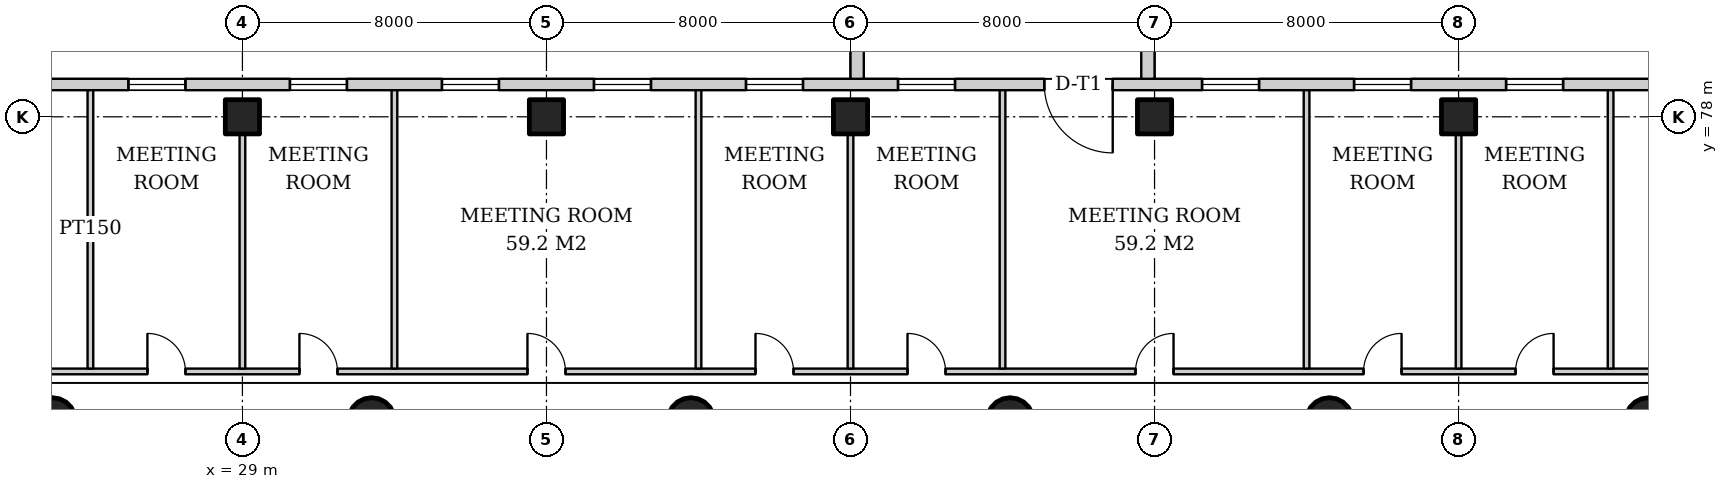
"""IFC4 building model, lengths in metres.
Left out: names, types, materials, properties, quantities, classifications, styles, units other than length and angle.
Written with IfcOpenShell. Run it as: python <this file> out.ifc"""

import sys

from ifc_helpers import new_model, si_unit, direction, frame, frame_2d, origin, origin_2d, place, context, subcontext, project, spatial, rectangle, hollow_circle, extrude, element, fill, save


model = new_model("IFC4")
c1 = context("Model", 3, precision=1e-05, world=origin(), true_north=direction((0.0, 1.0)))
c2 = subcontext(c1, "Body", "Model", "MODEL_VIEW")
j1 = project(units=[si_unit("LENGTHUNIT", "METRE"), si_unit("PLANEANGLEUNIT", "RADIAN")], contexts=[c1])
p1 = place(None, origin())
s1 = spatial("IfcSite", under=j1, at=p1, CompositionType="ELEMENT")
p2 = place(p1, origin())
s2 = spatial("IfcBuilding", under=s1, at=p2, CompositionType="ELEMENT")
p3 = place(p2, frame((0.0, 0.0, 11.0)))
s3 = spatial("IfcBuildingStorey", under=s2, at=p3, CompositionType="ELEMENT", Elevation=11.0)
for number, where, z_axis, x_axis in (
    (1, (29.0, 78.0, 0.0), (0.0, 0.0, 1.0), (1.0, 0.0, 0.0)),
    (2, (37.0, 78.0, 0.0), (0.0, 0.0, 1.0), (1.0, 0.0, 0.0)),
    (3, (45.0, 78.0, 0.0), (0.0, 0.0, 1.0), (1.0, 0.0, 0.0)),
    (4, (53.0, 78.0, 0.0), (0.0, 0.0, 1.0), (1.0, 0.0, 0.0)),
    (5, (61.0, 78.0, 0.0), (0.0, 0.0, 1.0), (1.0, 0.0, 0.0)),
):
    element("IfcColumn", number, at=place(p3, frame(where, z_axis=z_axis, x_axis=x_axis)), inside=s3, PredefinedType="COLUMN", context=c2, shape_type="SweptSolid", body=[
        extrude(rectangle(XDim=0.9, YDim=0.9, at=origin_2d()), origin(), (0.0, 0.0, 1.0), 5.0),
    ])
for number, where, z_axis, x_axis in (
    (6, (66.0, 70.0, 0.0), (0.0, 0.0, 1.0), (1.0, 0.0, 0.0)),
    (7, (24.0, 70.0, 0.0), (0.0, 0.0, 1.0), (1.0, 0.0, 0.0)),
    (8, (57.6, 70.0, 0.0), (0.0, 0.0, 1.0), (1.0, 0.0, 0.0)),
    (9, (49.2, 70.0, 0.0), (0.0, 0.0, 1.0), (1.0, 0.0, 0.0)),
    (10, (40.8, 70.0, 0.0), (0.0, 0.0, 1.0), (1.0, 0.0, 0.0)),
    (11, (32.4, 70.0, 0.0), (0.0, 0.0, 1.0), (1.0, 0.0, 0.0)),
):
    element("IfcColumn", number, at=place(p3, frame(where, z_axis=z_axis, x_axis=x_axis)), inside=s3, PredefinedType="COLUMN", context=c2, shape_type="SweptSolid", body=[
        extrude(hollow_circle(Radius=0.61, WallThickness=0.04, at=origin_2d()), origin(), (0.0, 0.0, 1.0), 5.0),
    ])
p4 = place(p3, frame((78.0, 78.85, 0.0), z_axis=(0.0, 0.0, 1.0), x_axis=(-1.0, 0.0, 0.0)))
e12 = element("IfcWall", 12, at=p4, inside=s3, PredefinedType="SOLIDWALL", context=c2, shape_type="SweptSolid", body=[
    extrude(rectangle(XDim=58.0, YDim=0.3, at=frame_2d((29.0, 0.0))), origin(), (0.0, 0.0, 1.0), 4.7),
])
p5 = place(p4, frame((1.5, 0.0, 0.9)))
e13 = element("IfcOpeningElement", 13, at=p5, cuts=e12, PredefinedType="OPENING", context=c2, shape_type="SweptSolid", body=[
    extrude(rectangle(XDim=1.5, YDim=3.2, at=frame_2d((0.75, 1.6))), frame((0.0, 0.16, 0.0), z_axis=(0.0, -1.0, 0.0), x_axis=(1.0, 0.0, 0.0)), (0.0, 0.0, 1.0), 0.32),
])
p6 = place(p4, frame((6.0, 0.0, 0.9)))
e14 = element("IfcOpeningElement", 14, at=p6, cuts=e12, PredefinedType="OPENING", context=c2, shape_type="SweptSolid", body=[
    extrude(rectangle(XDim=1.5, YDim=3.2, at=frame_2d((0.75, 1.6))), frame((0.0, 0.16, 0.0), z_axis=(0.0, -1.0, 0.0), x_axis=(1.0, 0.0, 0.0)), (0.0, 0.0, 1.0), 0.32),
])
p7 = place(p4, frame((10.25, 0.0, 0.9)))
e15 = element("IfcOpeningElement", 15, at=p7, cuts=e12, PredefinedType="OPENING", context=c2, shape_type="SweptSolid", body=[
    extrude(rectangle(XDim=1.5, YDim=3.2, at=frame_2d((0.75, 1.6))), frame((0.0, 0.16, 0.0), z_axis=(0.0, -1.0, 0.0), x_axis=(1.0, 0.0, 0.0)), (0.0, 0.0, 1.0), 0.32),
])
p8 = place(p4, frame((14.25, 0.0, 0.9)))
e16 = element("IfcOpeningElement", 16, at=p8, cuts=e12, PredefinedType="OPENING", context=c2, shape_type="SweptSolid", body=[
    extrude(rectangle(XDim=1.5, YDim=3.2, at=frame_2d((0.75, 1.6))), frame((0.0, 0.16, 0.0), z_axis=(0.0, -1.0, 0.0), x_axis=(1.0, 0.0, 0.0)), (0.0, 0.0, 1.0), 0.32),
])
p9 = place(p4, frame((18.25, 0.0, 0.9)))
e17 = element("IfcOpeningElement", 17, at=p9, cuts=e12, PredefinedType="OPENING", context=c2, shape_type="SweptSolid", body=[
    extrude(rectangle(XDim=1.5, YDim=3.2, at=frame_2d((0.75, 1.6))), frame((0.0, 0.16, 0.0), z_axis=(0.0, -1.0, 0.0), x_axis=(1.0, 0.0, 0.0)), (0.0, 0.0, 1.0), 0.32),
])
p10 = place(p4, frame((22.25, 0.0, 0.9)))
e18 = element("IfcOpeningElement", 18, at=p10, cuts=e12, PredefinedType="OPENING", context=c2, shape_type="SweptSolid", body=[
    extrude(rectangle(XDim=1.5, YDim=3.2, at=frame_2d((0.75, 1.6))), frame((0.0, 0.16, 0.0), z_axis=(0.0, -1.0, 0.0), x_axis=(1.0, 0.0, 0.0)), (0.0, 0.0, 1.0), 0.32),
])
p11 = place(p4, frame((26.1, 0.0, 0.0)))
e19 = element("IfcOpeningElement", 19, at=p11, cuts=e12, PredefinedType="OPENING", context=c2, shape_type="SweptSolid", body=[
    extrude(rectangle(XDim=1.8, YDim=2.4, at=frame_2d((0.9, 1.2))), frame((0.0, 0.16, 0.0), z_axis=(0.0, -1.0, 0.0), x_axis=(1.0, 0.0, 0.0)), (0.0, 0.0, 1.0), 0.32),
])
p12 = place(p4, frame((30.25, 0.0, 0.9)))
e20 = element("IfcOpeningElement", 20, at=p12, cuts=e12, PredefinedType="OPENING", context=c2, shape_type="SweptSolid", body=[
    extrude(rectangle(XDim=1.5, YDim=3.2, at=frame_2d((0.75, 1.6))), frame((0.0, 0.16, 0.0), z_axis=(0.0, -1.0, 0.0), x_axis=(1.0, 0.0, 0.0)), (0.0, 0.0, 1.0), 0.32),
])
p13 = place(p4, frame((34.25, 0.0, 0.9)))
e21 = element("IfcOpeningElement", 21, at=p13, cuts=e12, PredefinedType="OPENING", context=c2, shape_type="SweptSolid", body=[
    extrude(rectangle(XDim=1.5, YDim=3.2, at=frame_2d((0.75, 1.6))), frame((0.0, 0.16, 0.0), z_axis=(0.0, -1.0, 0.0), x_axis=(1.0, 0.0, 0.0)), (0.0, 0.0, 1.0), 0.32),
])
p14 = place(p4, frame((38.25, 0.0, 0.9)))
e22 = element("IfcOpeningElement", 22, at=p14, cuts=e12, PredefinedType="OPENING", context=c2, shape_type="SweptSolid", body=[
    extrude(rectangle(XDim=1.5, YDim=3.2, at=frame_2d((0.75, 1.6))), frame((0.0, 0.16, 0.0), z_axis=(0.0, -1.0, 0.0), x_axis=(1.0, 0.0, 0.0)), (0.0, 0.0, 1.0), 0.32),
])
p15 = place(p4, frame((42.25, 0.0, 0.9)))
e23 = element("IfcOpeningElement", 23, at=p15, cuts=e12, PredefinedType="OPENING", context=c2, shape_type="SweptSolid", body=[
    extrude(rectangle(XDim=1.5, YDim=3.2, at=frame_2d((0.75, 1.6))), frame((0.0, 0.16, 0.0), z_axis=(0.0, -1.0, 0.0), x_axis=(1.0, 0.0, 0.0)), (0.0, 0.0, 1.0), 0.32),
])
p16 = place(p4, frame((46.25, 0.0, 0.9)))
e24 = element("IfcOpeningElement", 24, at=p16, cuts=e12, PredefinedType="OPENING", context=c2, shape_type="SweptSolid", body=[
    extrude(rectangle(XDim=1.5, YDim=3.2, at=frame_2d((0.75, 1.6))), frame((0.0, 0.16, 0.0), z_axis=(0.0, -1.0, 0.0), x_axis=(1.0, 0.0, 0.0)), (0.0, 0.0, 1.0), 0.32),
])
p17 = place(p4, frame((50.5, 0.0, 0.9)))
e25 = element("IfcOpeningElement", 25, at=p17, cuts=e12, PredefinedType="OPENING", context=c2, shape_type="SweptSolid", body=[
    extrude(rectangle(XDim=1.5, YDim=3.2, at=frame_2d((0.75, 1.6))), frame((0.0, 0.16, 0.0), z_axis=(0.0, -1.0, 0.0), x_axis=(1.0, 0.0, 0.0)), (0.0, 0.0, 1.0), 0.32),
])
p18 = place(p4, frame((55.0, 0.0, 0.9)))
e26 = element("IfcOpeningElement", 26, at=p18, cuts=e12, PredefinedType="OPENING", context=c2, shape_type="SweptSolid", body=[
    extrude(rectangle(XDim=1.5, YDim=3.2, at=frame_2d((0.75, 1.6))), frame((0.0, 0.16, 0.0), z_axis=(0.0, -1.0, 0.0), x_axis=(1.0, 0.0, 0.0)), (0.0, 0.0, 1.0), 0.32),
])
for number, where, z_axis, x_axis in (
    (27, (45.175, 79.0, 0.0), (0.0, 0.0, 1.0), (0.0, 1.0, 0.0)),
    (28, (52.825, 79.0, 0.0), (0.0, 0.0, 1.0), (0.0, 1.0, 0.0)),
):
    element("IfcWall", number, at=place(p3, frame(where, z_axis=z_axis, x_axis=x_axis)), inside=s3, PredefinedType="PARAPET", context=c2, shape_type="SweptSolid", body=[
        extrude(rectangle(XDim=8.0, YDim=0.35, at=frame_2d((4.0, 0.0))), origin(), (0.0, 0.0, 1.0), 1.1),
    ])
p19 = place(p3, frame((20.3, 71.3, 0.0), z_axis=(0.0, 0.0, 1.0), x_axis=(1.0, 0.0, 0.0)))
e29 = element("IfcWall", 29, at=p19, inside=s3, PredefinedType="PARTITIONING", context=c2, shape_type="SweptSolid", body=[
    extrude(rectangle(XDim=57.4, YDim=0.15, at=frame_2d((28.7, 0.0))), origin(), (0.0, 0.0, 1.0), 3.2),
])
p20 = place(p19, frame((1.85, 0.0, 0.0)))
e30 = element("IfcOpeningElement", 30, at=p20, cuts=e29, PredefinedType="OPENING", context=c2, shape_type="SweptSolid", body=[
    extrude(rectangle(XDim=1.0, YDim=2.1, at=frame_2d((0.5, 1.05))), frame((0.0, 0.085, 0.0), z_axis=(0.0, -1.0, 0.0), x_axis=(1.0, 0.0, 0.0)), (0.0, 0.0, 1.0), 0.17),
])
p21 = place(p19, frame((6.2, 0.0, 0.0)))
e31 = element("IfcOpeningElement", 31, at=p21, cuts=e29, PredefinedType="OPENING", context=c2, shape_type="SweptSolid", body=[
    extrude(rectangle(XDim=1.0, YDim=2.1, at=frame_2d((0.5, 1.05))), frame((0.0, 0.085, 0.0), z_axis=(0.0, -1.0, 0.0), x_axis=(1.0, 0.0, 0.0)), (0.0, 0.0, 1.0), 0.17),
])
p22 = place(p19, frame((10.2, 0.0, 0.0)))
e32 = element("IfcOpeningElement", 32, at=p22, cuts=e29, PredefinedType="OPENING", context=c2, shape_type="SweptSolid", body=[
    extrude(rectangle(XDim=1.0, YDim=2.1, at=frame_2d((0.5, 1.05))), frame((0.0, 0.085, 0.0), z_axis=(0.0, -1.0, 0.0), x_axis=(1.0, 0.0, 0.0)), (0.0, 0.0, 1.0), 0.17),
])
p23 = place(p19, frame((16.2, 0.0, 0.0)))
e33 = element("IfcOpeningElement", 33, at=p23, cuts=e29, PredefinedType="OPENING", context=c2, shape_type="SweptSolid", body=[
    extrude(rectangle(XDim=1.0, YDim=2.1, at=frame_2d((0.5, 1.05))), frame((0.0, 0.085, 0.0), z_axis=(0.0, -1.0, 0.0), x_axis=(1.0, 0.0, 0.0)), (0.0, 0.0, 1.0), 0.17),
])
p24 = place(p19, frame((22.2, 0.0, 0.0)))
e34 = element("IfcOpeningElement", 34, at=p24, cuts=e29, PredefinedType="OPENING", context=c2, shape_type="SweptSolid", body=[
    extrude(rectangle(XDim=1.0, YDim=2.1, at=frame_2d((0.5, 1.05))), frame((0.0, 0.085, 0.0), z_axis=(0.0, -1.0, 0.0), x_axis=(1.0, 0.0, 0.0)), (0.0, 0.0, 1.0), 0.17),
])
p25 = place(p19, frame((26.2, 0.0, 0.0)))
e35 = element("IfcOpeningElement", 35, at=p25, cuts=e29, PredefinedType="OPENING", context=c2, shape_type="SweptSolid", body=[
    extrude(rectangle(XDim=1.0, YDim=2.1, at=frame_2d((0.5, 1.05))), frame((0.0, 0.085, 0.0), z_axis=(0.0, -1.0, 0.0), x_axis=(1.0, 0.0, 0.0)), (0.0, 0.0, 1.0), 0.17),
])
p26 = place(p19, frame((32.2, 0.0, 0.0)))
e36 = element("IfcOpeningElement", 36, at=p26, cuts=e29, PredefinedType="OPENING", context=c2, shape_type="SweptSolid", body=[
    extrude(rectangle(XDim=1.0, YDim=2.1, at=frame_2d((0.5, 1.05))), frame((0.0, 0.085, 0.0), z_axis=(0.0, -1.0, 0.0), x_axis=(1.0, 0.0, 0.0)), (0.0, 0.0, 1.0), 0.17),
])
p27 = place(p19, frame((38.2, 0.0, 0.0)))
e37 = element("IfcOpeningElement", 37, at=p27, cuts=e29, PredefinedType="OPENING", context=c2, shape_type="SweptSolid", body=[
    extrude(rectangle(XDim=1.0, YDim=2.1, at=frame_2d((0.5, 1.05))), frame((0.0, 0.085, 0.0), z_axis=(0.0, -1.0, 0.0), x_axis=(1.0, 0.0, 0.0)), (0.0, 0.0, 1.0), 0.17),
])
p28 = place(p19, frame((42.2, 0.0, 0.0)))
e38 = element("IfcOpeningElement", 38, at=p28, cuts=e29, PredefinedType="OPENING", context=c2, shape_type="SweptSolid", body=[
    extrude(rectangle(XDim=1.0, YDim=2.1, at=frame_2d((0.5, 1.05))), frame((0.0, 0.085, 0.0), z_axis=(0.0, -1.0, 0.0), x_axis=(1.0, 0.0, 0.0)), (0.0, 0.0, 1.0), 0.17),
])
p29 = place(p19, frame((48.2, 0.0, 0.0)))
e39 = element("IfcOpeningElement", 39, at=p29, cuts=e29, PredefinedType="OPENING", context=c2, shape_type="SweptSolid", body=[
    extrude(rectangle(XDim=1.0, YDim=2.1, at=frame_2d((0.5, 1.05))), frame((0.0, 0.085, 0.0), z_axis=(0.0, -1.0, 0.0), x_axis=(1.0, 0.0, 0.0)), (0.0, 0.0, 1.0), 0.17),
])
p30 = place(p19, frame((54.55, 0.0, 0.0)))
e40 = element("IfcOpeningElement", 40, at=p30, cuts=e29, PredefinedType="OPENING", context=c2, shape_type="SweptSolid", body=[
    extrude(rectangle(XDim=1.0, YDim=2.1, at=frame_2d((0.5, 1.05))), frame((0.0, 0.085, 0.0), z_axis=(0.0, -1.0, 0.0), x_axis=(1.0, 0.0, 0.0)), (0.0, 0.0, 1.0), 0.17),
])
p31 = place(p3, frame((25.0, 71.375, 0.0), z_axis=(0.0, 0.0, 1.0), x_axis=(0.0, 1.0, 0.0)))
e41 = element("IfcWall", 41, at=p31, inside=s3, PredefinedType="PARTITIONING", context=c2, shape_type="SweptSolid", body=[
    extrude(rectangle(XDim=7.325, YDim=0.15, at=frame_2d((3.663, 0.0))), origin(), (0.0, 0.0, 1.0), 3.2),
])
p32 = place(p3, frame((29.0, 71.375, 0.0), z_axis=(0.0, 0.0, 1.0), x_axis=(0.0, 1.0, 0.0)))
e42 = element("IfcWall", 42, at=p32, inside=s3, PredefinedType="PARTITIONING", context=c2, shape_type="SweptSolid", body=[
    extrude(rectangle(XDim=6.175, YDim=0.15, at=frame_2d((3.087, 0.0))), origin(), (0.0, 0.0, 1.0), 3.2),
])
for number, where, z_axis, x_axis in (
    (43, (33.0, 71.375, 0.0), (0.0, 0.0, 1.0), (0.0, 1.0, 0.0)),
    (44, (41.0, 71.375, 0.0), (0.0, 0.0, 1.0), (0.0, 1.0, 0.0)),
):
    element("IfcWall", number, at=place(p3, frame(where, z_axis=z_axis, x_axis=x_axis)), inside=s3, PredefinedType="PARTITIONING", context=c2, shape_type="SweptSolid", body=[
        extrude(rectangle(XDim=7.325, YDim=0.15, at=frame_2d((3.663, 0.0))), origin(), (0.0, 0.0, 1.0), 3.2),
    ])
p33 = place(p3, frame((45.0, 71.375, 0.0), z_axis=(0.0, 0.0, 1.0), x_axis=(0.0, 1.0, 0.0)))
e45 = element("IfcWall", 45, at=p33, inside=s3, PredefinedType="PARTITIONING", context=c2, shape_type="SweptSolid", body=[
    extrude(rectangle(XDim=6.175, YDim=0.15, at=frame_2d((3.087, 0.0))), origin(), (0.0, 0.0, 1.0), 3.2),
])
for number, where, z_axis, x_axis in (
    (46, (49.0, 71.375, 0.0), (0.0, 0.0, 1.0), (0.0, 1.0, 0.0)),
    (47, (57.0, 71.375, 0.0), (0.0, 0.0, 1.0), (0.0, 1.0, 0.0)),
):
    element("IfcWall", number, at=place(p3, frame(where, z_axis=z_axis, x_axis=x_axis)), inside=s3, PredefinedType="PARTITIONING", context=c2, shape_type="SweptSolid", body=[
        extrude(rectangle(XDim=7.325, YDim=0.15, at=frame_2d((3.663, 0.0))), origin(), (0.0, 0.0, 1.0), 3.2),
    ])
p34 = place(p3, frame((61.0, 71.375, 0.0), z_axis=(0.0, 0.0, 1.0), x_axis=(0.0, 1.0, 0.0)))
e48 = element("IfcWall", 48, at=p34, inside=s3, PredefinedType="PARTITIONING", context=c2, shape_type="SweptSolid", body=[
    extrude(rectangle(XDim=6.175, YDim=0.15, at=frame_2d((3.087, 0.0))), origin(), (0.0, 0.0, 1.0), 3.2),
])
p35 = place(p3, frame((65.0, 71.375, 0.0), z_axis=(0.0, 0.0, 1.0), x_axis=(0.0, 1.0, 0.0)))
e49 = element("IfcWall", 49, at=p35, inside=s3, PredefinedType="PARTITIONING", context=c2, shape_type="SweptSolid", body=[
    extrude(rectangle(XDim=7.325, YDim=0.15, at=frame_2d((3.663, 0.0))), origin(), (0.0, 0.0, 1.0), 3.2),
])
p36 = place(p8, origin())
e50 = element("IfcWindow", 50, at=p36, inside=s3, PartitioningType="SINGLE_PANEL", PredefinedType="WINDOW", context=c2, shape_type="SweptSolid", body=[
    extrude(rectangle(XDim=1.5, YDim=3.2, at=frame_2d((0.75, 1.6))), frame((0.0, 0.03, 0.0), z_axis=(0.0, -1.0, 0.0), x_axis=(1.0, 0.0, 0.0)), (0.0, 0.0, 1.0), 0.06),
])
fill(e16, e50)
p37 = place(p9, origin())
e51 = element("IfcWindow", 51, at=p37, inside=s3, PartitioningType="SINGLE_PANEL", PredefinedType="WINDOW", context=c2, shape_type="SweptSolid", body=[
    extrude(rectangle(XDim=1.5, YDim=3.2, at=frame_2d((0.75, 1.6))), frame((0.0, 0.03, 0.0), z_axis=(0.0, -1.0, 0.0), x_axis=(1.0, 0.0, 0.0)), (0.0, 0.0, 1.0), 0.06),
])
fill(e17, e51)
p38 = place(p10, origin())
e52 = element("IfcWindow", 52, at=p38, inside=s3, PartitioningType="SINGLE_PANEL", PredefinedType="WINDOW", context=c2, shape_type="SweptSolid", body=[
    extrude(rectangle(XDim=1.5, YDim=3.2, at=frame_2d((0.75, 1.6))), frame((0.0, 0.03, 0.0), z_axis=(0.0, -1.0, 0.0), x_axis=(1.0, 0.0, 0.0)), (0.0, 0.0, 1.0), 0.06),
])
fill(e18, e52)
p39 = place(p11, origin())
e53 = element("IfcDoor", 53, at=p39, inside=s3, OperationType="DOUBLE_DOOR_SINGLE_SWING", PredefinedType="DOOR", context=c2, shape_type="SweptSolid", body=[
    extrude(rectangle(XDim=1.8, YDim=2.4, at=frame_2d((0.9, 1.2))), frame((0.0, 0.025, 0.0), z_axis=(0.0, -1.0, 0.0), x_axis=(1.0, 0.0, 0.0)), (0.0, 0.0, 1.0), 0.05),
])
fill(e19, e53)
p40 = place(p12, origin())
e54 = element("IfcWindow", 54, at=p40, inside=s3, PartitioningType="SINGLE_PANEL", PredefinedType="WINDOW", context=c2, shape_type="SweptSolid", body=[
    extrude(rectangle(XDim=1.5, YDim=3.2, at=frame_2d((0.75, 1.6))), frame((0.0, 0.03, 0.0), z_axis=(0.0, -1.0, 0.0), x_axis=(1.0, 0.0, 0.0)), (0.0, 0.0, 1.0), 0.06),
])
fill(e20, e54)
p41 = place(p13, origin())
e55 = element("IfcWindow", 55, at=p41, inside=s3, PartitioningType="SINGLE_PANEL", PredefinedType="WINDOW", context=c2, shape_type="SweptSolid", body=[
    extrude(rectangle(XDim=1.5, YDim=3.2, at=frame_2d((0.75, 1.6))), frame((0.0, 0.03, 0.0), z_axis=(0.0, -1.0, 0.0), x_axis=(1.0, 0.0, 0.0)), (0.0, 0.0, 1.0), 0.06),
])
fill(e21, e55)
p42 = place(p14, origin())
e56 = element("IfcWindow", 56, at=p42, inside=s3, PartitioningType="SINGLE_PANEL", PredefinedType="WINDOW", context=c2, shape_type="SweptSolid", body=[
    extrude(rectangle(XDim=1.5, YDim=3.2, at=frame_2d((0.75, 1.6))), frame((0.0, 0.03, 0.0), z_axis=(0.0, -1.0, 0.0), x_axis=(1.0, 0.0, 0.0)), (0.0, 0.0, 1.0), 0.06),
])
fill(e22, e56)
p43 = place(p15, origin())
e57 = element("IfcWindow", 57, at=p43, inside=s3, PartitioningType="SINGLE_PANEL", PredefinedType="WINDOW", context=c2, shape_type="SweptSolid", body=[
    extrude(rectangle(XDim=1.5, YDim=3.2, at=frame_2d((0.75, 1.6))), frame((0.0, 0.03, 0.0), z_axis=(0.0, -1.0, 0.0), x_axis=(1.0, 0.0, 0.0)), (0.0, 0.0, 1.0), 0.06),
])
fill(e23, e57)
p44 = place(p16, origin())
e58 = element("IfcWindow", 58, at=p44, inside=s3, PartitioningType="SINGLE_PANEL", PredefinedType="WINDOW", context=c2, shape_type="SweptSolid", body=[
    extrude(rectangle(XDim=1.5, YDim=3.2, at=frame_2d((0.75, 1.6))), frame((0.0, 0.03, 0.0), z_axis=(0.0, -1.0, 0.0), x_axis=(1.0, 0.0, 0.0)), (0.0, 0.0, 1.0), 0.06),
])
fill(e24, e58)
p45 = place(p17, origin())
e59 = element("IfcWindow", 59, at=p45, inside=s3, PartitioningType="SINGLE_PANEL", PredefinedType="WINDOW", context=c2, shape_type="SweptSolid", body=[
    extrude(rectangle(XDim=1.5, YDim=3.2, at=frame_2d((0.75, 1.6))), frame((0.0, 0.03, 0.0), z_axis=(0.0, -1.0, 0.0), x_axis=(1.0, 0.0, 0.0)), (0.0, 0.0, 1.0), 0.06),
])
fill(e25, e59)
p46 = place(p21, origin())
e60 = element("IfcDoor", 60, at=p46, inside=s3, OperationType="SINGLE_SWING_LEFT", PredefinedType="DOOR", context=c2, shape_type="SweptSolid", body=[
    extrude(rectangle(XDim=1.0, YDim=2.1, at=frame_2d((0.5, 1.05))), frame((0.0, 0.025, 0.0), z_axis=(0.0, -1.0, 0.0), x_axis=(1.0, 0.0, 0.0)), (0.0, 0.0, 1.0), 0.05),
])
fill(e31, e60)
p47 = place(p22, origin())
e61 = element("IfcDoor", 61, at=p47, inside=s3, OperationType="SINGLE_SWING_LEFT", PredefinedType="DOOR", context=c2, shape_type="SweptSolid", body=[
    extrude(rectangle(XDim=1.0, YDim=2.1, at=frame_2d((0.5, 1.05))), frame((0.0, 0.025, 0.0), z_axis=(0.0, -1.0, 0.0), x_axis=(1.0, 0.0, 0.0)), (0.0, 0.0, 1.0), 0.05),
])
fill(e32, e61)
p48 = place(p23, origin())
e62 = element("IfcDoor", 62, at=p48, inside=s3, OperationType="SINGLE_SWING_LEFT", PredefinedType="DOOR", context=c2, shape_type="SweptSolid", body=[
    extrude(rectangle(XDim=1.0, YDim=2.1, at=frame_2d((0.5, 1.05))), frame((0.0, 0.025, 0.0), z_axis=(0.0, -1.0, 0.0), x_axis=(1.0, 0.0, 0.0)), (0.0, 0.0, 1.0), 0.05),
])
fill(e33, e62)
p49 = place(p24, origin())
e63 = element("IfcDoor", 63, at=p49, inside=s3, OperationType="SINGLE_SWING_LEFT", PredefinedType="DOOR", context=c2, shape_type="SweptSolid", body=[
    extrude(rectangle(XDim=1.0, YDim=2.1, at=frame_2d((0.5, 1.05))), frame((0.0, 0.025, 0.0), z_axis=(0.0, -1.0, 0.0), x_axis=(1.0, 0.0, 0.0)), (0.0, 0.0, 1.0), 0.05),
])
fill(e34, e63)
p50 = place(p25, origin())
e64 = element("IfcDoor", 64, at=p50, inside=s3, OperationType="SINGLE_SWING_LEFT", PredefinedType="DOOR", context=c2, shape_type="SweptSolid", body=[
    extrude(rectangle(XDim=1.0, YDim=2.1, at=frame_2d((0.5, 1.05))), frame((0.0, 0.025, 0.0), z_axis=(0.0, -1.0, 0.0), x_axis=(1.0, 0.0, 0.0)), (0.0, 0.0, 1.0), 0.05),
])
fill(e35, e64)
p51 = place(p26, origin())
e65 = element("IfcDoor", 65, at=p51, inside=s3, OperationType="SINGLE_SWING_RIGHT", PredefinedType="DOOR", context=c2, shape_type="SweptSolid", body=[
    extrude(rectangle(XDim=1.0, YDim=2.1, at=frame_2d((0.5, 1.05))), frame((0.0, 0.025, 0.0), z_axis=(0.0, -1.0, 0.0), x_axis=(1.0, 0.0, 0.0)), (0.0, 0.0, 1.0), 0.05),
])
fill(e36, e65)
p52 = place(p27, origin())
e66 = element("IfcDoor", 66, at=p52, inside=s3, OperationType="SINGLE_SWING_RIGHT", PredefinedType="DOOR", context=c2, shape_type="SweptSolid", body=[
    extrude(rectangle(XDim=1.0, YDim=2.1, at=frame_2d((0.5, 1.05))), frame((0.0, 0.025, 0.0), z_axis=(0.0, -1.0, 0.0), x_axis=(1.0, 0.0, 0.0)), (0.0, 0.0, 1.0), 0.05),
])
fill(e37, e66)
p53 = place(p28, origin())
e67 = element("IfcDoor", 67, at=p53, inside=s3, OperationType="SINGLE_SWING_RIGHT", PredefinedType="DOOR", context=c2, shape_type="SweptSolid", body=[
    extrude(rectangle(XDim=1.0, YDim=2.1, at=frame_2d((0.5, 1.05))), frame((0.0, 0.025, 0.0), z_axis=(0.0, -1.0, 0.0), x_axis=(1.0, 0.0, 0.0)), (0.0, 0.0, 1.0), 0.05),
])
fill(e38, e67)
save(model, sys.argv[1])
